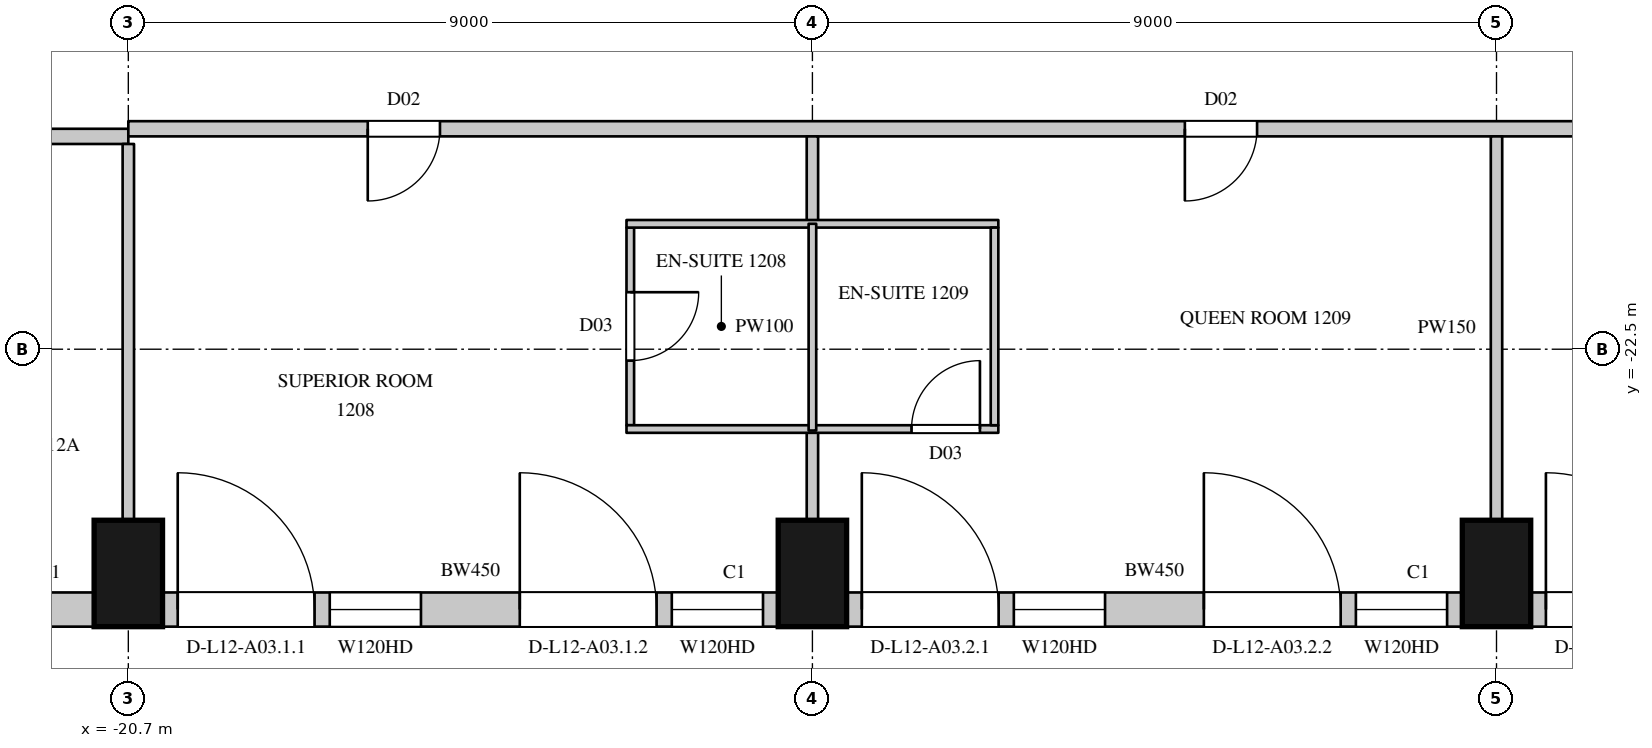
"""IFC4 building model, lengths in metres.
Left out: names, types, materials, properties, quantities, classifications, styles, units other than length and angle.
Written with IfcOpenShell. Run it as: python <this file> out.ifc"""

import sys

from ifc_helpers import new_model, si_unit, direction, frame, frame_2d, origin, origin_2d, place, context, subcontext, project, spatial, rectangle, extrude, element, fill, save


model = new_model("IFC4")
c1 = context("Model", 3, precision=1e-05, world=origin(), true_north=direction((0.0, 1.0)))
c2 = subcontext(c1, "Body", "Model", "MODEL_VIEW")
j1 = project(units=[si_unit("LENGTHUNIT", "METRE"), si_unit("PLANEANGLEUNIT", "RADIAN")], contexts=[c1])
p1 = place(None, origin())
s1 = spatial("IfcSite", under=j1, at=p1, CompositionType="ELEMENT")
p2 = place(p1, origin())
s2 = spatial("IfcBuilding", under=s1, at=p2, CompositionType="ELEMENT")
p3 = place(p2, frame((0.0, 0.0, 73.5)))
s3 = spatial("IfcBuildingStorey", under=s2, at=p3, CompositionType="ELEMENT", Elevation=73.5)
for number, where, z_axis, x_axis in (
    (1, (-20.7, -25.45, 0.0), (0.0, 0.0, 1.0), (1.0, 0.0, 0.0)),
    (2, (-11.7, -25.45, 0.0), (0.0, 0.0, 1.0), (1.0, 0.0, 0.0)),
    (3, (-2.7, -25.45, 0.0), (0.0, 0.0, 1.0), (1.0, 0.0, 0.0)),
):
    element("IfcColumn", number, at=place(p3, frame(where, z_axis=z_axis, x_axis=x_axis)), inside=s3, PredefinedType="COLUMN", context=c2, shape_type="SweptSolid", body=[
        extrude(rectangle(XDim=0.9, YDim=1.4, at=origin_2d()), origin(), (0.0, 0.0, 1.0), 3.6),
    ])
p4 = place(p3, frame((-24.064, -25.925, 0.0), z_axis=(0.0, 0.0, 1.0), x_axis=(1.0, 0.0, 0.0)))
e4 = element("IfcWall", 4, at=p4, inside=s3, PredefinedType="SOLIDWALL", context=c2, shape_type="SweptSolid", body=[
    extrude(rectangle(XDim=2.914, YDim=0.45, at=frame_2d((1.457, 0.0))), origin(), (0.0, 0.0, 1.0), 3.3),
])
p5 = place(p3, frame((-20.25, -25.925, 0.0), z_axis=(0.0, 0.0, 1.0), x_axis=(1.0, 0.0, 0.0)))
e5 = element("IfcWall", 5, at=p5, inside=s3, PredefinedType="SOLIDWALL", context=c2, shape_type="SweptSolid", body=[
    extrude(rectangle(XDim=8.1, YDim=0.45, at=frame_2d((4.05, 0.0))), origin(), (0.0, 0.0, 1.0), 3.3),
])
p6 = place(p5, frame((0.2, 0.0, 0.0)))
e6 = element("IfcOpeningElement", 6, at=p6, cuts=e5, PredefinedType="OPENING", context=c2, shape_type="SweptSolid", body=[
    extrude(rectangle(XDim=1.8, YDim=2.4, at=frame_2d((0.9, 1.2))), frame((0.0, 0.235, 0.0), z_axis=(0.0, -1.0, 0.0), x_axis=(1.0, 0.0, 0.0)), (0.0, 0.0, 1.0), 0.47),
])
p7 = place(p5, frame((2.2, 0.0, 1.05)))
e7 = element("IfcOpeningElement", 7, at=p7, cuts=e5, PredefinedType="OPENING", context=c2, shape_type="SweptSolid", body=[
    extrude(rectangle(XDim=1.2, YDim=2.0, at=frame_2d((0.6, 1.0))), frame((0.0, 0.235, 0.0), z_axis=(0.0, -1.0, 0.0), x_axis=(1.0, 0.0, 0.0)), (0.0, 0.0, 1.0), 0.47),
])
p8 = place(p5, frame((4.7, 0.0, 0.0)))
e8 = element("IfcOpeningElement", 8, at=p8, cuts=e5, PredefinedType="OPENING", context=c2, shape_type="SweptSolid", body=[
    extrude(rectangle(XDim=1.8, YDim=2.4, at=frame_2d((0.9, 1.2))), frame((0.0, 0.235, 0.0), z_axis=(0.0, -1.0, 0.0), x_axis=(1.0, 0.0, 0.0)), (0.0, 0.0, 1.0), 0.47),
])
p9 = place(p5, frame((6.7, 0.0, 1.05)))
e9 = element("IfcOpeningElement", 9, at=p9, cuts=e5, PredefinedType="OPENING", context=c2, shape_type="SweptSolid", body=[
    extrude(rectangle(XDim=1.2, YDim=2.0, at=frame_2d((0.6, 1.0))), frame((0.0, 0.235, 0.0), z_axis=(0.0, -1.0, 0.0), x_axis=(1.0, 0.0, 0.0)), (0.0, 0.0, 1.0), 0.47),
])
p10 = place(p3, frame((-11.25, -25.925, 0.0), z_axis=(0.0, 0.0, 1.0), x_axis=(1.0, 0.0, 0.0)))
e10 = element("IfcWall", 10, at=p10, inside=s3, PredefinedType="SOLIDWALL", context=c2, shape_type="SweptSolid", body=[
    extrude(rectangle(XDim=8.1, YDim=0.45, at=frame_2d((4.05, 0.0))), origin(), (0.0, 0.0, 1.0), 3.3),
])
p11 = place(p10, frame((0.2, 0.0, 0.0)))
e11 = element("IfcOpeningElement", 11, at=p11, cuts=e10, PredefinedType="OPENING", context=c2, shape_type="SweptSolid", body=[
    extrude(rectangle(XDim=1.8, YDim=2.4, at=frame_2d((0.9, 1.2))), frame((0.0, 0.235, 0.0), z_axis=(0.0, -1.0, 0.0), x_axis=(1.0, 0.0, 0.0)), (0.0, 0.0, 1.0), 0.47),
])
p12 = place(p10, frame((2.2, 0.0, 1.05)))
e12 = element("IfcOpeningElement", 12, at=p12, cuts=e10, PredefinedType="OPENING", context=c2, shape_type="SweptSolid", body=[
    extrude(rectangle(XDim=1.2, YDim=2.0, at=frame_2d((0.6, 1.0))), frame((0.0, 0.235, 0.0), z_axis=(0.0, -1.0, 0.0), x_axis=(1.0, 0.0, 0.0)), (0.0, 0.0, 1.0), 0.47),
])
p13 = place(p10, frame((4.7, 0.0, 0.0)))
e13 = element("IfcOpeningElement", 13, at=p13, cuts=e10, PredefinedType="OPENING", context=c2, shape_type="SweptSolid", body=[
    extrude(rectangle(XDim=1.8, YDim=2.4, at=frame_2d((0.9, 1.2))), frame((0.0, 0.235, 0.0), z_axis=(0.0, -1.0, 0.0), x_axis=(1.0, 0.0, 0.0)), (0.0, 0.0, 1.0), 0.47),
])
p14 = place(p10, frame((6.7, 0.0, 1.05)))
e14 = element("IfcOpeningElement", 14, at=p14, cuts=e10, PredefinedType="OPENING", context=c2, shape_type="SweptSolid", body=[
    extrude(rectangle(XDim=1.2, YDim=2.0, at=frame_2d((0.6, 1.0))), frame((0.0, 0.235, 0.0), z_axis=(0.0, -1.0, 0.0), x_axis=(1.0, 0.0, 0.0)), (0.0, 0.0, 1.0), 0.47),
])
p15 = place(p3, frame((-2.25, -25.925, 0.0), z_axis=(0.0, 0.0, 1.0), x_axis=(1.0, 0.0, 0.0)))
e15 = element("IfcWall", 15, at=p15, inside=s3, PredefinedType="SOLIDWALL", context=c2, shape_type="SweptSolid", body=[
    extrude(rectangle(XDim=8.1, YDim=0.45, at=frame_2d((4.05, 0.0))), origin(), (0.0, 0.0, 1.0), 3.3),
])
p16 = place(p15, frame((0.2, 0.0, 0.0)))
e16 = element("IfcOpeningElement", 16, at=p16, cuts=e15, PredefinedType="OPENING", context=c2, shape_type="SweptSolid", body=[
    extrude(rectangle(XDim=1.8, YDim=2.4, at=frame_2d((0.9, 1.2))), frame((0.0, 0.235, 0.0), z_axis=(0.0, -1.0, 0.0), x_axis=(1.0, 0.0, 0.0)), (0.0, 0.0, 1.0), 0.47),
])
p17 = place(p15, frame((2.2, 0.0, 1.05)))
e17 = element("IfcOpeningElement", 17, at=p17, cuts=e15, PredefinedType="OPENING", context=c2, shape_type="SweptSolid", body=[
    extrude(rectangle(XDim=1.2, YDim=2.0, at=frame_2d((0.6, 1.0))), frame((0.0, 0.235, 0.0), z_axis=(0.0, -1.0, 0.0), x_axis=(1.0, 0.0, 0.0)), (0.0, 0.0, 1.0), 0.47),
])
p18 = place(p15, frame((4.7, 0.0, 0.0)))
e18 = element("IfcOpeningElement", 18, at=p18, cuts=e15, PredefinedType="OPENING", context=c2, shape_type="SweptSolid", body=[
    extrude(rectangle(XDim=1.8, YDim=2.4, at=frame_2d((0.9, 1.2))), frame((0.0, 0.235, 0.0), z_axis=(0.0, -1.0, 0.0), x_axis=(1.0, 0.0, 0.0)), (0.0, 0.0, 1.0), 0.47),
])
p19 = place(p15, frame((6.7, 0.0, 1.05)))
e19 = element("IfcOpeningElement", 19, at=p19, cuts=e15, PredefinedType="OPENING", context=c2, shape_type="SweptSolid", body=[
    extrude(rectangle(XDim=1.2, YDim=2.0, at=frame_2d((0.6, 1.0))), frame((0.0, 0.235, 0.0), z_axis=(0.0, -1.0, 0.0), x_axis=(1.0, 0.0, 0.0)), (0.0, 0.0, 1.0), 0.47),
])
p20 = place(p3, frame((-23.7, -19.7, 0.0), z_axis=(0.0, 0.0, 1.0), x_axis=(1.0, 0.0, 0.0)))
e20 = element("IfcWall", 20, at=p20, inside=s3, PredefinedType="PARTITIONING", context=c2, shape_type="SweptSolid", body=[
    extrude(rectangle(XDim=3.0, YDim=0.2, at=frame_2d((1.5, 0.0))), origin(), (0.0, 0.0, 1.0), 3.3),
])
p21 = place(p20, frame((0.8, 0.0, 0.0)))
e21 = element("IfcOpeningElement", 21, at=p21, cuts=e20, PredefinedType="OPENING", context=c2, shape_type="SweptSolid", body=[
    extrude(rectangle(XDim=0.9, YDim=2.2, at=frame_2d((0.45, 1.1))), frame((0.0, 0.11, 0.0), z_axis=(0.0, -1.0, 0.0), x_axis=(1.0, 0.0, 0.0)), (0.0, 0.0, 1.0), 0.22),
])
p22 = place(p3, frame((-20.7, -19.6, 0.0), z_axis=(0.0, 0.0, 1.0), x_axis=(1.0, 0.0, 0.0)))
e22 = element("IfcWall", 22, at=p22, inside=s3, PredefinedType="PARTITIONING", context=c2, shape_type="SweptSolid", body=[
    extrude(rectangle(XDim=38.825, YDim=0.2, at=frame_2d((19.413, 0.0))), origin(), (0.0, 0.0, 1.0), 3.3),
])
p23 = place(p22, frame((3.15, 0.0, 0.0)))
e23 = element("IfcOpeningElement", 23, at=p23, cuts=e22, PredefinedType="OPENING", context=c2, shape_type="SweptSolid", body=[
    extrude(rectangle(XDim=0.95, YDim=2.2, at=frame_2d((0.475, 1.1))), frame((0.0, 0.11, 0.0), z_axis=(0.0, -1.0, 0.0), x_axis=(1.0, 0.0, 0.0)), (0.0, 0.0, 1.0), 0.22),
])
p24 = place(p22, frame((13.9, 0.0, 0.0)))
e24 = element("IfcOpeningElement", 24, at=p24, cuts=e22, PredefinedType="OPENING", context=c2, shape_type="SweptSolid", body=[
    extrude(rectangle(XDim=0.95, YDim=2.2, at=frame_2d((0.475, 1.1))), frame((0.0, 0.11, 0.0), z_axis=(0.0, -1.0, 0.0), x_axis=(1.0, 0.0, 0.0)), (0.0, 0.0, 1.0), 0.22),
])
p25 = place(p22, frame((21.15, 0.0, 0.0)))
e25 = element("IfcOpeningElement", 25, at=p25, cuts=e22, PredefinedType="OPENING", context=c2, shape_type="SweptSolid", body=[
    extrude(rectangle(XDim=0.95, YDim=2.2, at=frame_2d((0.475, 1.1))), frame((0.0, 0.11, 0.0), z_axis=(0.0, -1.0, 0.0), x_axis=(1.0, 0.0, 0.0)), (0.0, 0.0, 1.0), 0.22),
])
p26 = place(p22, frame((29.75, 0.0, 0.0)))
e26 = element("IfcOpeningElement", 26, at=p26, cuts=e22, PredefinedType="OPENING", context=c2, shape_type="SweptSolid", body=[
    extrude(rectangle(XDim=1.1, YDim=2.4, at=frame_2d((0.55, 1.2))), frame((0.0, 0.11, 0.0), z_axis=(0.0, -1.0, 0.0), x_axis=(1.0, 0.0, 0.0)), (0.0, 0.0, 1.0), 0.22),
])
p27 = place(p3, frame((-20.7, -24.75, 0.0), z_axis=(0.0, 0.0, 1.0), x_axis=(0.0, 1.0, 0.0)))
e27 = element("IfcWall", 27, at=p27, inside=s3, PredefinedType="PARTITIONING", context=c2, shape_type="SweptSolid", body=[
    extrude(rectangle(XDim=4.95, YDim=0.15, at=frame_2d((2.475, 0.0))), origin(), (0.0, 0.0, 1.0), 2.75),
])
p28 = place(p3, frame((-11.7, -24.75, 0.0), z_axis=(0.0, 0.0, 1.0), x_axis=(0.0, 1.0, 0.0)))
e28 = element("IfcWall", 28, at=p28, inside=s3, PredefinedType="PARTITIONING", context=c2, shape_type="SweptSolid", body=[
    extrude(rectangle(XDim=1.18, YDim=0.15, at=frame_2d((0.59, 0.0))), origin(), (0.0, 0.0, 1.0), 2.75),
])
p29 = place(p3, frame((-11.7, -20.85, 0.0), z_axis=(0.0, 0.0, 1.0), x_axis=(0.0, 1.0, 0.0)))
e29 = element("IfcWall", 29, at=p29, inside=s3, PredefinedType="PARTITIONING", context=c2, shape_type="SweptSolid", body=[
    extrude(rectangle(XDim=1.15, YDim=0.15, at=frame_2d((0.575, 0.0))), origin(), (0.0, 0.0, 1.0), 2.75),
])
p30 = place(p3, frame((-2.7, -24.75, 0.0), z_axis=(0.0, 0.0, 1.0), x_axis=(0.0, 1.0, 0.0)))
e30 = element("IfcWall", 30, at=p30, inside=s3, PredefinedType="PARTITIONING", context=c2, shape_type="SweptSolid", body=[
    extrude(rectangle(XDim=5.05, YDim=0.15, at=frame_2d((2.525, 0.0))), origin(), (0.0, 0.0, 1.0), 2.75),
])
p31 = place(p3, frame((-14.096, -23.5, 0.0), z_axis=(0.0, 0.0, 1.0), x_axis=(0.0, 1.0, 0.0)))
e31 = element("IfcWall", 31, at=p31, inside=s3, PredefinedType="PARTITIONING", context=c2, shape_type="SweptSolid", body=[
    extrude(rectangle(XDim=2.6, YDim=0.1, at=frame_2d((1.3, 0.0))), origin(), (0.0, 0.0, 1.0), 3.3),
])
p32 = place(p31, frame((0.85, 0.0, 0.0)))
e32 = element("IfcOpeningElement", 32, at=p32, cuts=e31, PredefinedType="OPENING", context=c2, shape_type="SweptSolid", body=[
    extrude(rectangle(XDim=0.9, YDim=2.2, at=frame_2d((0.45, 1.1))), frame((0.0, 0.06, 0.0), z_axis=(0.0, -1.0, 0.0), x_axis=(1.0, 0.0, 0.0)), (0.0, 0.0, 1.0), 0.12),
])
p33 = place(p3, frame((-14.146, -23.55, 0.0), z_axis=(0.0, 0.0, 1.0), x_axis=(1.0, 0.0, 0.0)))
e33 = element("IfcWall", 33, at=p33, inside=s3, PredefinedType="PARTITIONING", context=c2, shape_type="SweptSolid", body=[
    extrude(rectangle(XDim=4.892, YDim=0.1, at=frame_2d((2.446, 0.0))), origin(), (0.0, 0.0, 1.0), 3.3),
])
p34 = place(p33, frame((3.75, 0.0, 0.0)))
e34 = element("IfcOpeningElement", 34, at=p34, cuts=e33, PredefinedType="OPENING", context=c2, shape_type="SweptSolid", body=[
    extrude(rectangle(XDim=0.9, YDim=2.2, at=frame_2d((0.45, 1.1))), frame((0.0, 0.06, 0.0), z_axis=(0.0, -1.0, 0.0), x_axis=(1.0, 0.0, 0.0)), (0.0, 0.0, 1.0), 0.12),
])
p35 = place(p3, frame((-14.146, -20.85, 0.0), z_axis=(0.0, 0.0, 1.0), x_axis=(1.0, 0.0, 0.0)))
e35 = element("IfcWall", 35, at=p35, inside=s3, PredefinedType="PARTITIONING", context=c2, shape_type="SweptSolid", body=[
    extrude(rectangle(XDim=4.892, YDim=0.1, at=frame_2d((2.446, 0.0))), origin(), (0.0, 0.0, 1.0), 3.3),
])
p36 = place(p3, frame((-11.7, -23.57, 0.0), z_axis=(0.0, 0.0, 1.0), x_axis=(0.0, 1.0, 0.0)))
e36 = element("IfcWall", 36, at=p36, inside=s3, PredefinedType="PARTITIONING", context=c2, shape_type="SweptSolid", body=[
    extrude(rectangle(XDim=2.72, YDim=0.1, at=frame_2d((1.36, 0.0))), origin(), (0.0, 0.0, 1.0), 2.75),
])
p37 = place(p3, frame((-9.304, -23.5, 0.0), z_axis=(0.0, 0.0, 1.0), x_axis=(0.0, 1.0, 0.0)))
e37 = element("IfcWall", 37, at=p37, inside=s3, PredefinedType="PARTITIONING", context=c2, shape_type="SweptSolid", body=[
    extrude(rectangle(XDim=2.6, YDim=0.1, at=frame_2d((1.3, 0.0))), origin(), (0.0, 0.0, 1.0), 3.3),
])
p38 = place(p6, origin())
e38 = element("IfcDoor", 38, at=p38, inside=s3, OperationType="SLIDING_TO_LEFT", PredefinedType="DOOR", context=c2, shape_type="SweptSolid", body=[
    extrude(rectangle(XDim=1.8, YDim=2.4, at=frame_2d((0.9, 1.2))), frame((0.0, 0.13, 0.0), z_axis=(0.0, -1.0, 0.0), x_axis=(1.0, 0.0, 0.0)), (0.0, 0.0, 1.0), 0.05),
])
fill(e6, e38)
p39 = place(p7, origin())
e39 = element("IfcWindow", 39, at=p39, inside=s3, PartitioningType="SINGLE_PANEL", PredefinedType="WINDOW", context=c2, shape_type="SweptSolid", body=[
    extrude(rectangle(XDim=1.2, YDim=2.0, at=frame_2d((0.6, 1.0))), frame((0.0, 0.135, 0.0), z_axis=(0.0, -1.0, 0.0), x_axis=(1.0, 0.0, 0.0)), (0.0, 0.0, 1.0), 0.06),
])
fill(e7, e39)
p40 = place(p8, origin())
e40 = element("IfcDoor", 40, at=p40, inside=s3, OperationType="SLIDING_TO_LEFT", PredefinedType="DOOR", context=c2, shape_type="SweptSolid", body=[
    extrude(rectangle(XDim=1.8, YDim=2.4, at=frame_2d((0.9, 1.2))), frame((0.0, 0.13, 0.0), z_axis=(0.0, -1.0, 0.0), x_axis=(1.0, 0.0, 0.0)), (0.0, 0.0, 1.0), 0.05),
])
fill(e8, e40)
p41 = place(p9, origin())
e41 = element("IfcWindow", 41, at=p41, inside=s3, PartitioningType="SINGLE_PANEL", PredefinedType="WINDOW", context=c2, shape_type="SweptSolid", body=[
    extrude(rectangle(XDim=1.2, YDim=2.0, at=frame_2d((0.6, 1.0))), frame((0.0, 0.135, 0.0), z_axis=(0.0, -1.0, 0.0), x_axis=(1.0, 0.0, 0.0)), (0.0, 0.0, 1.0), 0.06),
])
fill(e9, e41)
p42 = place(p11, origin())
e42 = element("IfcDoor", 42, at=p42, inside=s3, OperationType="SLIDING_TO_LEFT", PredefinedType="DOOR", context=c2, shape_type="SweptSolid", body=[
    extrude(rectangle(XDim=1.8, YDim=2.4, at=frame_2d((0.9, 1.2))), frame((0.0, 0.13, 0.0), z_axis=(0.0, -1.0, 0.0), x_axis=(1.0, 0.0, 0.0)), (0.0, 0.0, 1.0), 0.05),
])
fill(e11, e42)
p43 = place(p12, origin())
e43 = element("IfcWindow", 43, at=p43, inside=s3, PartitioningType="SINGLE_PANEL", PredefinedType="WINDOW", context=c2, shape_type="SweptSolid", body=[
    extrude(rectangle(XDim=1.2, YDim=2.0, at=frame_2d((0.6, 1.0))), frame((0.0, 0.135, 0.0), z_axis=(0.0, -1.0, 0.0), x_axis=(1.0, 0.0, 0.0)), (0.0, 0.0, 1.0), 0.06),
])
fill(e12, e43)
p44 = place(p13, origin())
e44 = element("IfcDoor", 44, at=p44, inside=s3, OperationType="SLIDING_TO_LEFT", PredefinedType="DOOR", context=c2, shape_type="SweptSolid", body=[
    extrude(rectangle(XDim=1.8, YDim=2.4, at=frame_2d((0.9, 1.2))), frame((0.0, 0.13, 0.0), z_axis=(0.0, -1.0, 0.0), x_axis=(1.0, 0.0, 0.0)), (0.0, 0.0, 1.0), 0.05),
])
fill(e13, e44)
p45 = place(p14, origin())
e45 = element("IfcWindow", 45, at=p45, inside=s3, PartitioningType="SINGLE_PANEL", PredefinedType="WINDOW", context=c2, shape_type="SweptSolid", body=[
    extrude(rectangle(XDim=1.2, YDim=2.0, at=frame_2d((0.6, 1.0))), frame((0.0, 0.135, 0.0), z_axis=(0.0, -1.0, 0.0), x_axis=(1.0, 0.0, 0.0)), (0.0, 0.0, 1.0), 0.06),
])
fill(e14, e45)
p46 = place(p16, origin())
e46 = element("IfcDoor", 46, at=p46, inside=s3, OperationType="SLIDING_TO_LEFT", PredefinedType="DOOR", context=c2, shape_type="SweptSolid", body=[
    extrude(rectangle(XDim=1.8, YDim=2.4, at=frame_2d((0.9, 1.2))), frame((0.0, 0.13, 0.0), z_axis=(0.0, -1.0, 0.0), x_axis=(1.0, 0.0, 0.0)), (0.0, 0.0, 1.0), 0.05),
])
fill(e16, e46)
p47 = place(p23, origin())
e47 = element("IfcDoor", 47, at=p47, inside=s3, OperationType="SINGLE_SWING_RIGHT", PredefinedType="DOOR", context=c2, shape_type="SweptSolid", body=[
    extrude(rectangle(XDim=0.95, YDim=2.2, at=frame_2d((0.475, 1.1))), frame((0.0, 0.025, 0.0), z_axis=(0.0, -1.0, 0.0), x_axis=(1.0, 0.0, 0.0)), (0.0, 0.0, 1.0), 0.05),
])
fill(e23, e47)
p48 = place(p32, origin())
e48 = element("IfcDoor", 48, at=p48, inside=s3, OperationType="SINGLE_SWING_LEFT", PredefinedType="DOOR", context=c2, shape_type="SweptSolid", body=[
    extrude(rectangle(XDim=0.9, YDim=2.2, at=frame_2d((0.45, 1.1))), frame((0.0, 0.025, 0.0), z_axis=(0.0, -1.0, 0.0), x_axis=(1.0, 0.0, 0.0)), (0.0, 0.0, 1.0), 0.05),
])
fill(e32, e48)
p49 = place(p24, origin())
e49 = element("IfcDoor", 49, at=p49, inside=s3, OperationType="SINGLE_SWING_RIGHT", PredefinedType="DOOR", context=c2, shape_type="SweptSolid", body=[
    extrude(rectangle(XDim=0.95, YDim=2.2, at=frame_2d((0.475, 1.1))), frame((0.0, 0.025, 0.0), z_axis=(0.0, -1.0, 0.0), x_axis=(1.0, 0.0, 0.0)), (0.0, 0.0, 1.0), 0.05),
])
fill(e24, e49)
p50 = place(p34, origin())
e50 = element("IfcDoor", 50, at=p50, inside=s3, OperationType="SINGLE_SWING_RIGHT", PredefinedType="DOOR", context=c2, shape_type="SweptSolid", body=[
    extrude(rectangle(XDim=0.9, YDim=2.2, at=frame_2d((0.45, 1.1))), frame((0.0, 0.025, 0.0), z_axis=(0.0, -1.0, 0.0), x_axis=(1.0, 0.0, 0.0)), (0.0, 0.0, 1.0), 0.05),
])
fill(e34, e50)
save(model, sys.argv[1])
